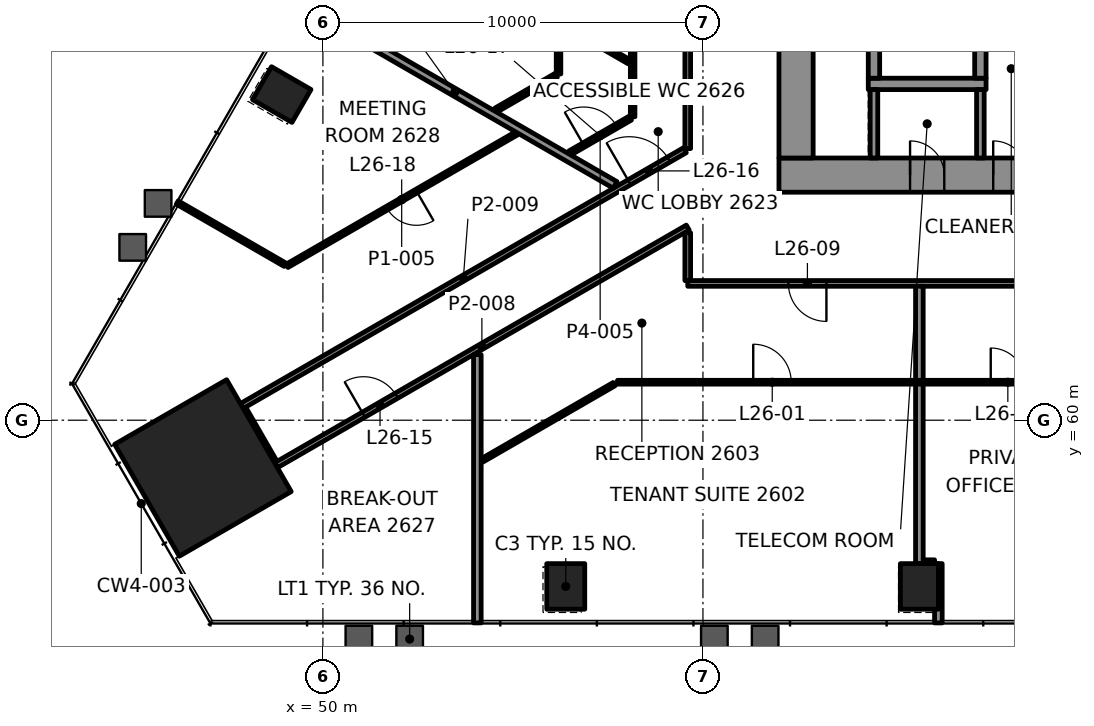
"""IFC4 building model, lengths in metres.
Left out: names, types, materials, properties, quantities, classifications, styles, units other than length and angle.
Written with IfcOpenShell. Run it as: python <this file> out.ifc"""

import sys

from ifc_helpers import new_model, si_unit, direction, frame, frame_2d, origin, origin_2d, place, context, subcontext, project, spatial, rectangle, extrude, element, fill, save


model = new_model("IFC4")
c1 = context("Model", 3, precision=1e-05, world=origin(), true_north=direction((0.0, 1.0)))
c2 = subcontext(c1, "Body", "Model", "MODEL_VIEW")
j1 = project(units=[si_unit("LENGTHUNIT", "METRE"), si_unit("PLANEANGLEUNIT", "RADIAN")], contexts=[c1])
p1 = place(None, origin())
s1 = spatial("IfcSite", under=j1, at=p1, CompositionType="ELEMENT")
p2 = place(p1, origin())
s2 = spatial("IfcBuilding", under=s1, at=p2, CompositionType="ELEMENT")
p3 = place(p2, frame((0.0, 0.0, 115.6)))
s3 = spatial("IfcBuildingStorey", under=s2, at=p3, CompositionType="ELEMENT", Elevation=115.6)
p4 = place(p3, frame((46.844, 58.744, 0.0), z_axis=(0.0, 0.0, 1.0), x_axis=(0.5, -0.866025403784, 0.0)))
e1 = element("IfcColumn", 1, at=p4, inside=s3, PredefinedType="COLUMN", context=c2, shape_type="SweptSolid", body=[
    extrude(rectangle(XDim=3.4, YDim=3.4, at=origin_2d()), origin(), (0.0, 0.0, 1.0), 4.2),
])
for number, where, z_axis, x_axis in (
    (2, (56.39, 55.626, -0.0), (0.0, 0.0, 1.0), (1.0, 0.0, 0.0)),
    (3, (65.695, 55.626, -0.0), (0.0, 0.0, 1.0), (1.0, 0.0, 0.0)),
    (4, (48.917, 68.57, -0.0), (0.0, 0.0, 1.0), (-0.5, -0.866, 0.0)),
):
    element("IfcColumn", number, at=place(p3, frame(where, z_axis=z_axis, x_axis=x_axis)), inside=s3, PredefinedType="COLUMN", context=c2, shape_type="SweptSolid", body=[
        extrude(rectangle(XDim=1.0, YDim=1.2, at=origin_2d()), origin(), (0.0, 0.0, 1.0), 4.2),
    ])
p5 = place(p3, frame((62.0, 66.45, 0.0), z_axis=(0.0, 0.0, 1.0), x_axis=(1.0, 0.0, 0.0)))
e5 = element("IfcWall", 5, at=p5, inside=s3, PredefinedType="SHEAR", context=c2, shape_type="SweptSolid", body=[
    extrude(rectangle(XDim=26.0, YDim=0.9, at=frame_2d((13.0, 0.0))), origin(), (0.0, 0.0, 1.0), 4.0),
])
p6 = place(p5, frame((3.45, 0.0, 0.0)))
e6 = element("IfcOpeningElement", 6, at=p6, cuts=e5, PredefinedType="OPENING", context=c2, shape_type="SweptSolid", body=[
    extrude(rectangle(XDim=0.9, YDim=2.1, at=frame_2d((0.45, 1.05))), frame((0.0, 0.46, 0.0), z_axis=(0.0, -1.0, 0.0), x_axis=(1.0, 0.0, 0.0)), (0.0, 0.0, 1.0), 0.92),
])
p7 = place(p5, frame((5.637, 0.0, 0.0)))
e7 = element("IfcOpeningElement", 7, at=p7, cuts=e5, PredefinedType="OPENING", context=c2, shape_type="SweptSolid", body=[
    extrude(rectangle(XDim=0.9, YDim=2.1, at=frame_2d((0.45, 1.05))), frame((0.0, 0.46, 0.0), z_axis=(0.0, -1.0, 0.0), x_axis=(1.0, 0.0, 0.0)), (0.0, 0.0, 1.0), 0.92),
])
p8 = place(p5, frame((7.212, 0.0, 0.0)))
e8 = element("IfcOpeningElement", 8, at=p8, cuts=e5, PredefinedType="OPENING", context=c2, shape_type="SweptSolid", body=[
    extrude(rectangle(XDim=0.9, YDim=2.1, at=frame_2d((0.45, 1.05))), frame((0.0, 0.46, 0.0), z_axis=(0.0, -1.0, 0.0), x_axis=(1.0, 0.0, 0.0)), (0.0, 0.0, 1.0), 0.92),
])
p9 = place(p5, frame((8.999, 0.0, 0.0)))
e9 = element("IfcOpeningElement", 9, at=p9, cuts=e5, PredefinedType="OPENING", context=c2, shape_type="SweptSolid", body=[
    extrude(rectangle(XDim=0.9, YDim=2.1, at=frame_2d((0.45, 1.05))), frame((0.0, 0.46, 0.0), z_axis=(0.0, -1.0, 0.0), x_axis=(1.0, 0.0, 0.0)), (0.0, 0.0, 1.0), 0.92),
])
p10 = place(p5, frame((17.324, 0.0, 0.0)))
e10 = element("IfcOpeningElement", 10, at=p10, cuts=e5, PredefinedType="OPENING", context=c2, shape_type="SweptSolid", body=[
    extrude(rectangle(XDim=0.9, YDim=2.1, at=frame_2d((0.45, 1.05))), frame((0.0, 0.46, 0.0), z_axis=(0.0, -1.0, 0.0), x_axis=(1.0, 0.0, 0.0)), (0.0, 0.0, 1.0), 0.92),
])
p11 = place(p3, frame((62.45, 66.9, 0.0), z_axis=(0.0, 0.0, 1.0), x_axis=(0.0, 1.0, 0.0)))
e11 = element("IfcWall", 11, at=p11, inside=s3, PredefinedType="SHEAR", context=c2, shape_type="SweptSolid", body=[
    extrude(rectangle(XDim=16.2, YDim=0.9, at=frame_2d((8.1, 0.0))), origin(), (0.0, 0.0, 1.0), 4.0),
])
p12 = place(p11, frame((5.5, 0.0, 0.0)))
e12 = element("IfcOpeningElement", 12, at=p12, cuts=e11, PredefinedType="OPENING", context=c2, shape_type="SweptSolid", body=[
    extrude(rectangle(XDim=1.8, YDim=2.1, at=frame_2d((0.9, 1.05))), frame((0.0, 0.46, 0.0), z_axis=(0.0, -1.0, 0.0), x_axis=(1.0, 0.0, 0.0)), (0.0, 0.0, 1.0), 0.92),
])
p13 = place(p3, frame((64.35, 68.85, 0.0), z_axis=(0.0, 0.0, 1.0), x_axis=(1.0, 0.0, 0.0)))
e13 = element("IfcWall", 13, at=p13, inside=s3, PredefinedType="SHEAR", context=c2, shape_type="SweptSolid", body=[
    extrude(rectangle(XDim=3.1, YDim=0.3, at=frame_2d((1.55, 0.0))), origin(), (0.0, 0.0, 1.0), 4.0),
])
for number, where, z_axis, x_axis in (
    (14, (64.5, 69.0, 0.0), (0.0, 0.0, 1.0), (0.0, 1.0, 0.0)),
    (15, (67.3, 69.0, 0.0), (0.0, 0.0, 1.0), (0.0, 1.0, 0.0)),
):
    element("IfcWall", number, at=place(p3, frame(where, z_axis=z_axis, x_axis=x_axis)), inside=s3, PredefinedType="SHEAR", context=c2, shape_type="SweptSolid", body=[
        extrude(rectangle(XDim=2.6, YDim=0.3, at=frame_2d((1.3, 0.0))), origin(), (0.0, 0.0, 1.0), 4.0),
    ])
p14 = place(p3, frame((65.805, 56.226, 0.0), z_axis=(0.0, 0.0, 1.0), x_axis=(1.0, 0.0, 0.0)))
e16 = element("IfcWall", 16, at=p14, inside=s3, PredefinedType="PARTITIONING", context=c2, shape_type="SweptSolid", body=[
    extrude(rectangle(XDim=0.29, YDim=0.2, at=frame_2d((0.145, 0.0))), origin(), (0.0, 0.0, 1.0), 3.4),
])
p15 = place(p3, frame((57.751, 61.0, 0.0), z_axis=(0.0, 0.0, 1.0), x_axis=(1.0, 0.0, 0.0)))
e17 = element("IfcWall", 17, at=p15, inside=s3, PredefinedType="PARTITIONING", context=c2, shape_type="SweptSolid", body=[
    extrude(rectangle(XDim=33.533, YDim=0.1, at=frame_2d((16.766, 0.0))), origin(), (0.0, 0.0, 1.0), 3.4),
])
p16 = place(p15, frame((3.572, 0.0, 0.0)))
e18 = element("IfcOpeningElement", 18, at=p16, cuts=e17, PredefinedType="OPENING", context=c2, shape_type="SweptSolid", body=[
    extrude(rectangle(XDim=1.0, YDim=2.1, at=frame_2d((0.5, 1.05))), frame((0.0, 0.06, 0.0), z_axis=(0.0, -1.0, 0.0), x_axis=(1.0, 0.0, 0.0)), (0.0, 0.0, 1.0), 0.12),
])
p17 = place(p15, frame((9.822, 0.0, 0.0)))
e19 = element("IfcOpeningElement", 19, at=p17, cuts=e17, PredefinedType="OPENING", context=c2, shape_type="SweptSolid", body=[
    extrude(rectangle(XDim=0.9, YDim=2.1, at=frame_2d((0.45, 1.05))), frame((0.0, 0.06, 0.0), z_axis=(0.0, -1.0, 0.0), x_axis=(1.0, 0.0, 0.0)), (0.0, 0.0, 1.0), 0.12),
])
p18 = place(p15, frame((14.472, 0.0, 0.0)))
e20 = element("IfcOpeningElement", 20, at=p18, cuts=e17, PredefinedType="OPENING", context=c2, shape_type="SweptSolid", body=[
    extrude(rectangle(XDim=0.9, YDim=2.1, at=frame_2d((0.45, 1.05))), frame((0.0, 0.06, 0.0), z_axis=(0.0, -1.0, 0.0), x_axis=(1.0, 0.0, 0.0)), (0.0, 0.0, 1.0), 0.12),
])
p19 = place(p15, frame((19.124, 0.0, 0.0)))
e21 = element("IfcOpeningElement", 21, at=p19, cuts=e17, PredefinedType="OPENING", context=c2, shape_type="SweptSolid", body=[
    extrude(rectangle(XDim=0.9, YDim=2.1, at=frame_2d((0.45, 1.05))), frame((0.0, 0.06, 0.0), z_axis=(0.0, -1.0, 0.0), x_axis=(1.0, 0.0, 0.0)), (0.0, 0.0, 1.0), 0.12),
])
p20 = place(p15, frame((24.361, 0.0, 0.0)))
e22 = element("IfcOpeningElement", 22, at=p20, cuts=e17, PredefinedType="OPENING", context=c2, shape_type="SweptSolid", body=[
    extrude(rectangle(XDim=0.9, YDim=2.1, at=frame_2d((0.45, 1.05))), frame((0.0, 0.06, 0.0), z_axis=(0.0, -1.0, 0.0), x_axis=(1.0, 0.0, 0.0)), (0.0, 0.0, 1.0), 0.12),
])
p21 = place(p15, frame((30.073, 0.0, 0.0)))
e23 = element("IfcOpeningElement", 23, at=p21, cuts=e17, PredefinedType="OPENING", context=c2, shape_type="SweptSolid", body=[
    extrude(rectangle(XDim=0.9, YDim=2.1, at=frame_2d((0.45, 1.05))), frame((0.0, 0.06, 0.0), z_axis=(0.0, -1.0, 0.0), x_axis=(1.0, 0.0, 0.0)), (0.0, 0.0, 1.0), 0.12),
])
p22 = place(p3, frame((90.399, 63.6, 0.0), z_axis=(0.0, 0.0, 1.0), x_axis=(-1.0, 0.0, 0.0)))
e24 = element("IfcWall", 24, at=p22, inside=s3, PredefinedType="PARTITIONING", context=c2, shape_type="SweptSolid", body=[
    extrude(rectangle(XDim=30.799, YDim=0.15, at=frame_2d((15.4, 0.0))), origin(), (0.0, 0.0, 1.0), 3.4),
])
p23 = place(p22, frame((4.975, 0.0, 0.0)))
e25 = element("IfcOpeningElement", 25, at=p23, cuts=e24, PredefinedType="OPENING", context=c2, shape_type="SweptSolid", body=[
    extrude(rectangle(XDim=1.0, YDim=2.1, at=frame_2d((0.5, 1.05))), frame((0.0, 0.085, 0.0), z_axis=(0.0, -1.0, 0.0), x_axis=(1.0, 0.0, 0.0)), (0.0, 0.0, 1.0), 0.17),
])
p24 = place(p22, frame((17.226, 0.0, 0.0)))
e26 = element("IfcOpeningElement", 26, at=p24, cuts=e24, PredefinedType="OPENING", context=c2, shape_type="SweptSolid", body=[
    extrude(rectangle(XDim=1.0, YDim=2.1, at=frame_2d((0.5, 1.05))), frame((0.0, 0.085, 0.0), z_axis=(0.0, -1.0, 0.0), x_axis=(1.0, 0.0, 0.0)), (0.0, 0.0, 1.0), 0.17),
])
p25 = place(p22, frame((27.151, 0.0, 0.0)))
e27 = element("IfcOpeningElement", 27, at=p25, cuts=e24, PredefinedType="OPENING", context=c2, shape_type="SweptSolid", body=[
    extrude(rectangle(XDim=1.0, YDim=2.1, at=frame_2d((0.5, 1.05))), frame((0.0, 0.085, 0.0), z_axis=(0.0, -1.0, 0.0), x_axis=(1.0, 0.0, 0.0)), (0.0, 0.0, 1.0), 0.17),
])
p26 = place(p3, frame((54.189, 58.944, 0.0), z_axis=(0.0, 0.0, 1.0), x_axis=(0.866025502096, 0.499999829719, 0.0)))
e28 = element("IfcWall", 28, at=p26, inside=s3, PredefinedType="PARTITIONING", context=c2, shape_type="SweptSolid", body=[
    extrude(rectangle(XDim=4.013, YDim=0.1, at=frame_2d((2.006, 0.0))), origin(), (0.0, 0.0, 1.0), 3.4),
])
p27 = place(p3, frame((48.766, 58.815, 0.0), z_axis=(0.0, 0.0, 1.0), x_axis=(0.866028284225, 0.499995010897, 0.0)))
e29 = element("IfcWall", 29, at=p27, inside=s3, PredefinedType="PARTITIONING", context=c2, shape_type="SweptSolid", body=[
    extrude(rectangle(XDim=12.51, YDim=0.15, at=frame_2d((6.255, 0.0))), origin(), (0.0, 0.0, 1.0), 3.247),
])
p28 = place(p27, frame((2.66, 0.0, 0.0)))
e30 = element("IfcOpeningElement", 30, at=p28, cuts=e29, PredefinedType="OPENING", context=c2, shape_type="SweptSolid", body=[
    extrude(rectangle(XDim=1.0, YDim=2.1, at=frame_2d((0.5, 1.05))), frame((0.0, 0.085, 0.0), z_axis=(0.0, -1.0, 0.0), x_axis=(1.0, 0.0, 0.0)), (0.0, 0.0, 1.0), 0.17),
])
p29 = place(p3, frame((47.866, 60.374, 0.0), z_axis=(0.0, 0.0, 1.0), x_axis=(0.866031566243, 0.499989326157, 0.0)))
e31 = element("IfcWall", 31, at=p29, inside=s3, PredefinedType="PARTITIONING", context=c2, shape_type="SweptSolid", body=[
    extrude(rectangle(XDim=13.462, YDim=0.15, at=frame_2d((6.731, 0.0))), origin(), (0.0, 0.0, 1.0), 3.4),
])
p30 = place(p29, frame((11.774, 0.0, 0.0)))
e32 = element("IfcOpeningElement", 32, at=p30, cuts=e31, PredefinedType="OPENING", context=c2, shape_type="SweptSolid", body=[
    extrude(rectangle(XDim=1.2, YDim=2.1, at=frame_2d((0.6, 1.05))), frame((0.0, 0.085, 0.0), z_axis=(0.0, -1.0, 0.0), x_axis=(1.0, 0.0, 0.0)), (0.0, 0.0, 1.0), 0.17),
])
p31 = place(p3, frame((56.501, 67.033, 0.0), z_axis=(0.0, 0.0, 1.0), x_axis=(0.866023842607, 0.500002704028, 0.0)))
e33 = element("IfcWall", 33, at=p31, inside=s3, PredefinedType="PARTITIONING", context=c2, shape_type="SweptSolid", body=[
    extrude(rectangle(XDim=1.835, YDim=0.12, at=frame_2d((0.917, 0.0))), origin(), (0.0, 0.0, 1.0), 3.4),
])
p32 = place(p31, frame((0.417, 0.0, 0.0)))
e34 = element("IfcOpeningElement", 34, at=p32, cuts=e33, PredefinedType="OPENING", context=c2, shape_type="SweptSolid", body=[
    extrude(rectangle(XDim=1.0, YDim=2.1, at=frame_2d((0.5, 1.05))), frame((0.0, 0.07, 0.0), z_axis=(0.0, -1.0, 0.0), x_axis=(1.0, 0.0, 0.0)), (0.0, 0.0, 1.0), 0.14),
])
p33 = place(p3, frame((55.09, 67.547, 0.0), z_axis=(0.0, 0.0, 1.0), x_axis=(-0.8660245535, -0.500001472733, 0.0)))
e35 = element("IfcWall", 35, at=p33, inside=s3, PredefinedType="PARTITIONING", context=c2, shape_type="SweptSolid", body=[
    extrude(rectangle(XDim=6.968, YDim=0.1, at=frame_2d((3.484, 0.0))), origin(), (0.0, 0.0, 1.0), 3.4),
])
p34 = place(p33, frame((3.034, 0.0, 0.0)))
e36 = element("IfcOpeningElement", 36, at=p34, cuts=e35, PredefinedType="OPENING", context=c2, shape_type="SweptSolid", body=[
    extrude(rectangle(XDim=0.9, YDim=2.1, at=frame_2d((0.45, 1.05))), frame((0.0, 0.06, 0.0), z_axis=(0.0, -1.0, 0.0), x_axis=(1.0, 0.0, 0.0)), (0.0, 0.0, 1.0), 0.12),
])
p35 = place(p3, frame((54.551, 68.159, 0.0), z_axis=(0.0, 0.0, 1.0), x_axis=(0.866023842607, 0.500002704028, 0.0)))
e37 = element("IfcWall", 37, at=p35, inside=s3, PredefinedType="PARTITIONING", context=c2, shape_type="SweptSolid", body=[
    extrude(rectangle(XDim=1.835, YDim=0.12, at=frame_2d((0.917, 0.0))), origin(), (0.0, 0.0, 1.0), 3.4),
])
p36 = place(p3, frame((66.195, 54.666, 0.0), z_axis=(0.0, 0.0, 1.0), x_axis=(0.0, 1.0, 0.0)))
e38 = element("IfcWall", 38, at=p36, inside=s3, PredefinedType="PARTITIONING", context=c2, shape_type="SweptSolid", body=[
    extrude(rectangle(XDim=1.56, YDim=0.2, at=frame_2d((0.78, 0.0))), origin(), (0.0, 0.0, 1.0), 3.165),
])
p37 = place(p3, frame((65.695, 56.226, 0.0), z_axis=(0.0, 0.0, 1.0), x_axis=(0.0, 1.0, 0.0)))
e39 = element("IfcWall", 39, at=p37, inside=s3, PredefinedType="PARTITIONING", context=c2, shape_type="SweptSolid", body=[
    extrude(rectangle(XDim=4.724, YDim=0.2, at=frame_2d((2.362, 0.0))), origin(), (0.0, 0.0, 1.0), 3.4),
])
p38 = place(p3, frame((59.6, 63.675, 0.0), z_axis=(0.0, 0.0, 1.0), x_axis=(0.0, 1.0, 0.0)))
e40 = element("IfcWall", 40, at=p38, inside=s3, PredefinedType="PARTITIONING", context=c2, shape_type="SweptSolid", body=[
    extrude(rectangle(XDim=1.258, YDim=0.15, at=frame_2d((0.629, 0.0))), origin(), (0.0, 0.0, 1.0), 3.247),
])
p39 = place(p3, frame((59.6, 67.148, 0.0), z_axis=(0.0, 0.0, 1.0), x_axis=(0.0, 1.0, 0.0)))
e41 = element("IfcWall", 41, at=p39, inside=s3, PredefinedType="PARTITIONING", context=c2, shape_type="SweptSolid", body=[
    extrude(rectangle(XDim=19.251, YDim=0.15, at=frame_2d((9.626, 0.0))), origin(), (0.0, 0.0, 1.0), 3.4),
])
p40 = place(p3, frame((58.15, 73.984, 0.0), z_axis=(0.0, 0.0, 1.0), x_axis=(0.0, -1.0, 0.0)))
e42 = element("IfcWall", 42, at=p40, inside=s3, PredefinedType="PARTITIONING", context=c2, shape_type="SweptSolid", body=[
    extrude(rectangle(XDim=5.999, YDim=0.12, at=frame_2d((3.0, 0.0))), origin(), (0.0, 0.0, 1.0), 3.4),
])
p41 = place(p40, frame((0.803, 0.0, 0.0)))
e43 = element("IfcOpeningElement", 43, at=p41, cuts=e42, PredefinedType="OPENING", context=c2, shape_type="SweptSolid", body=[
    extrude(rectangle(XDim=0.9, YDim=2.1, at=frame_2d((0.45, 1.05))), frame((0.0, 0.07, 0.0), z_axis=(0.0, -1.0, 0.0), x_axis=(1.0, 0.0, 0.0)), (0.0, 0.0, 1.0), 0.14),
])
p42 = place(p40, frame((3.003, 0.0, 0.0)))
e44 = element("IfcOpeningElement", 44, at=p42, cuts=e42, PredefinedType="OPENING", context=c2, shape_type="SweptSolid", body=[
    extrude(rectangle(XDim=0.9, YDim=2.1, at=frame_2d((0.45, 1.05))), frame((0.0, 0.07, 0.0), z_axis=(0.0, -1.0, 0.0), x_axis=(1.0, 0.0, 0.0)), (0.0, 0.0, 1.0), 0.14),
])
p43 = place(p3, frame((56.2, 69.111, 0.0), z_axis=(0.0, 0.0, 1.0), x_axis=(0.0, 1.0, 0.0)))
e45 = element("IfcWall", 45, at=p43, inside=s3, PredefinedType="PARTITIONING", context=c2, shape_type="SweptSolid", body=[
    extrude(rectangle(XDim=5.999, YDim=0.12, at=frame_2d((2.999, 0.0))), origin(), (0.0, 0.0, 1.0), 3.4),
])
p44 = place(p3, frame((54.064, 54.666, 0.0), z_axis=(0.0, 0.0, 1.0), x_axis=(0.0, 1.0, 0.0)))
e46 = element("IfcWall", 46, at=p44, inside=s3, PredefinedType="PARTITIONING", context=c2, shape_type="SweptSolid", body=[
    extrude(rectangle(XDim=7.06, YDim=0.2, at=frame_2d((3.53, 0.0))), origin(), (0.0, 0.0, 1.0), 3.4),
])
p45 = place(p3, frame((48.728, 58.88, 0.0), z_axis=(0.0, 0.0, 1.0), x_axis=(-0.500008692254, 0.866020385251, 0.0)))
e47 = element("IfcWall", 47, at=p45, inside=s3, PredefinedType="PARTITIONING", context=c2, shape_type="SweptSolid", body=[
    extrude(rectangle(XDim=1.649, YDim=0.15, at=frame_2d((0.824, 0.0))), origin(), (0.0, 0.0, 1.0), 3.247),
])
p46 = place(p3, frame((58.055, 69.434, 0.0), z_axis=(0.0, 0.0, 1.0), x_axis=(-0.866017611601, 0.500013496215, 0.0)))
e48 = element("IfcWall", 48, at=p46, inside=s3, PredefinedType="PARTITIONING", context=c2, shape_type="SweptSolid", body=[
    extrude(rectangle(XDim=2.033, YDim=0.12, at=frame_2d((1.017, 0.0))), origin(), (0.0, 0.0, 1.0), 3.4),
])
p47 = place(p3, frame((57.689, 66.191, 0.0), z_axis=(0.0, 0.0, 1.0), x_axis=(-0.866022484486, 0.500005056339, 0.0)))
e49 = element("IfcWall", 49, at=p47, inside=s3, PredefinedType="PARTITIONING", context=c2, shape_type="SweptSolid", body=[
    extrude(rectangle(XDim=9.747, YDim=0.2, at=frame_2d((4.873, 0.0))), origin(), (0.0, 0.0, 1.0), 3.165),
])
p48 = place(p3, frame((49.005, 64.091, 0.0), z_axis=(0.0, 0.0, 1.0), x_axis=(-0.866005637992, 0.500034233794, 0.0)))
e50 = element("IfcWall", 50, at=p48, inside=s3, PredefinedType="PARTITIONING", context=c2, shape_type="SweptSolid", body=[
    extrude(rectangle(XDim=3.276, YDim=0.1, at=frame_2d((1.638, 0.0))), origin(), (0.0, 0.0, 1.0), 3.4),
])
p49 = place(p3, frame((65.695, 61.05, 0.0), z_axis=(0.0, 0.0, 1.0), x_axis=(0.0, 1.0, 0.0)))
e51 = element("IfcWall", 51, at=p49, inside=s3, PredefinedType="PARTITIONING", context=c2, shape_type="SweptSolid", body=[
    extrude(rectangle(XDim=2.475, YDim=0.2, at=frame_2d((1.237, 0.0))), origin(), (0.0, 0.0, 1.0), 3.4),
])
for number, where, z_axis, x_axis in (
    (52, (64.5, 66.9, 0.0), (0.0, 0.0, 1.0), (0.0, 1.0, 0.0)),
    (53, (67.3, 66.9, 0.0), (0.0, 0.0, 1.0), (0.0, 1.0, 0.0)),
):
    element("IfcWall", number, at=place(p3, frame(where, z_axis=z_axis, x_axis=x_axis)), inside=s3, PredefinedType="PARTITIONING", context=c2, shape_type="SweptSolid", body=[
        extrude(rectangle(XDim=1.8, YDim=0.2, at=frame_2d((0.9, 0.0))), origin(), (0.0, 0.0, 1.0), 4.0),
    ])
p50 = place(p16, origin())
e54 = element("IfcDoor", 54, at=p50, inside=s3, OperationType="SINGLE_SWING_LEFT", PredefinedType="DOOR", context=c2, shape_type="SweptSolid", body=[
    extrude(rectangle(XDim=1.0, YDim=2.1, at=frame_2d((0.5, 1.05))), frame((0.0, 0.025, 0.0), z_axis=(0.0, -1.0, 0.0), x_axis=(1.0, 0.0, 0.0)), (0.0, 0.0, 1.0), 0.05),
])
fill(e18, e54)
p51 = place(p17, origin())
e55 = element("IfcDoor", 55, at=p51, inside=s3, OperationType="SINGLE_SWING_RIGHT", PredefinedType="DOOR", context=c2, shape_type="SweptSolid", body=[
    extrude(rectangle(XDim=0.9, YDim=2.1, at=frame_2d((0.45, 1.05))), frame((0.0, 0.025, 0.0), z_axis=(0.0, -1.0, 0.0), x_axis=(1.0, 0.0, 0.0)), (0.0, 0.0, 1.0), 0.05),
])
fill(e19, e55)
p52 = place(p25, origin())
e56 = element("IfcDoor", 56, at=p52, inside=s3, OperationType="SINGLE_SWING_LEFT", PredefinedType="DOOR", context=c2, shape_type="SweptSolid", body=[
    extrude(rectangle(XDim=1.0, YDim=2.1, at=frame_2d((0.5, 1.05))), frame((0.0, 0.025, 0.0), z_axis=(0.0, -1.0, 0.0), x_axis=(1.0, 0.0, 0.0)), (0.0, 0.0, 1.0), 0.05),
])
fill(e27, e56)
p53 = place(p28, origin())
e57 = element("IfcDoor", 57, at=p53, inside=s3, OperationType="SINGLE_SWING_RIGHT", PredefinedType="DOOR", context=c2, shape_type="SweptSolid", body=[
    extrude(rectangle(XDim=1.0, YDim=2.1, at=frame_2d((0.5, 1.05))), frame((0.0, 0.025, 0.0), z_axis=(0.0, -1.0, 0.0), x_axis=(1.0, 0.0, 0.0)), (0.0, 0.0, 1.0), 0.05),
])
fill(e30, e57)
p54 = place(p30, origin())
e58 = element("IfcDoor", 58, at=p54, inside=s3, OperationType="DOUBLE_DOOR_SINGLE_SWING", PredefinedType="DOOR", context=c2, shape_type="SweptSolid", body=[
    extrude(rectangle(XDim=1.2, YDim=2.1, at=frame_2d((0.6, 1.05))), frame((0.0, 0.025, 0.0), z_axis=(0.0, -1.0, 0.0), x_axis=(1.0, 0.0, 0.0)), (0.0, 0.0, 1.0), 0.05),
])
fill(e32, e58)
p55 = place(p32, origin())
e59 = element("IfcDoor", 59, at=p55, inside=s3, OperationType="SINGLE_SWING_LEFT", PredefinedType="DOOR", context=c2, shape_type="SweptSolid", body=[
    extrude(rectangle(XDim=1.0, YDim=2.1, at=frame_2d((0.5, 1.05))), frame((0.0, 0.025, 0.0), z_axis=(0.0, -1.0, 0.0), x_axis=(1.0, 0.0, 0.0)), (0.0, 0.0, 1.0), 0.05),
])
fill(e34, e59)
p56 = place(p34, origin())
e60 = element("IfcDoor", 60, at=p56, inside=s3, OperationType="SINGLE_SWING_RIGHT", PredefinedType="DOOR", context=c2, shape_type="SweptSolid", body=[
    extrude(rectangle(XDim=0.9, YDim=2.1, at=frame_2d((0.45, 1.05))), frame((0.0, 0.025, 0.0), z_axis=(0.0, -1.0, 0.0), x_axis=(1.0, 0.0, 0.0)), (0.0, 0.0, 1.0), 0.05),
])
fill(e36, e60)
p57 = place(p6, origin())
e61 = element("IfcDoor", 61, at=p57, inside=s3, OperationType="SINGLE_SWING_LEFT", PredefinedType="DOOR", context=c2, shape_type="SweptSolid", body=[
    extrude(rectangle(XDim=0.9, YDim=2.1, at=frame_2d((0.45, 1.05))), frame((0.0, 0.17, 0.0), z_axis=(0.0, -1.0, 0.0), x_axis=(1.0, 0.0, 0.0)), (0.0, 0.0, 1.0), 0.34),
])
fill(e6, e61)
p58 = place(p7, origin())
e62 = element("IfcDoor", 62, at=p58, inside=s3, OperationType="SINGLE_SWING_RIGHT", PredefinedType="DOOR", context=c2, shape_type="SweptSolid", body=[
    extrude(rectangle(XDim=0.9, YDim=2.1, at=frame_2d((0.45, 1.05))), frame((0.0, 0.17, 0.0), z_axis=(0.0, -1.0, 0.0), x_axis=(1.0, 0.0, 0.0)), (0.0, 0.0, 1.0), 0.34),
])
fill(e7, e62)
save(model, sys.argv[1])
